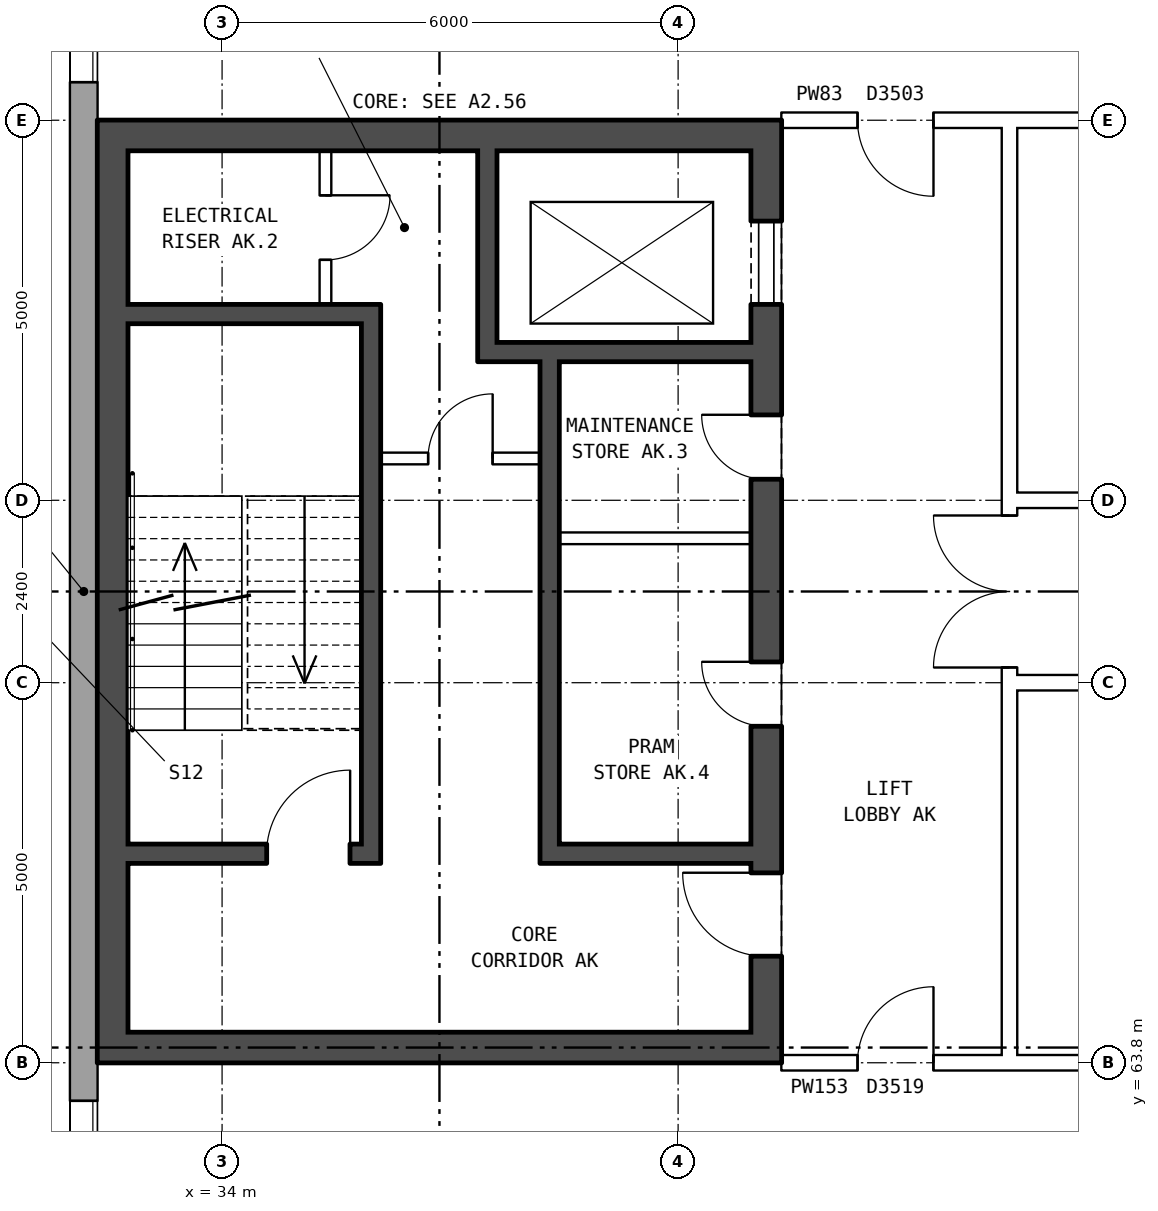
"""IFC4 building model, lengths in metres.
Left out: names, types, materials, properties, quantities, classifications, styles, units other than length and angle.
Written with IfcOpenShell. Run it as: python <this file> out.ifc"""

import sys

from ifc_helpers import new_model, si_unit, direction, frame, frame_2d, origin, place, context, subcontext, project, spatial, rectangle, extrude, element, fill, save


model = new_model("IFC4")
c1 = context("Model", 3, precision=1e-05, world=origin(), true_north=direction((0.0, 1.0)))
c2 = subcontext(c1, "Body", "Model", "MODEL_VIEW")
j1 = project(units=[si_unit("LENGTHUNIT", "METRE"), si_unit("PLANEANGLEUNIT", "RADIAN")], contexts=[c1])
p1 = place(None, origin())
s1 = spatial("IfcSite", under=j1, at=p1, CompositionType="ELEMENT")
p2 = place(p1, origin())
s2 = spatial("IfcBuilding", under=s1, at=p2, CompositionType="ELEMENT")
p3 = place(p2, frame((0.0, 0.0, 194.4)))
s3 = spatial("IfcBuildingStorey", under=s2, at=p3, CompositionType="ELEMENT", Elevation=194.4)
p4 = place(p3, frame((32.18, 82.925, 0.0), z_axis=(0.0, 0.0, 1.0), x_axis=(0.0, -1.0, 0.0)))
e1 = element("IfcWall", 1, at=p4, inside=s3, PredefinedType="STANDARD", context=c2, shape_type="SweptSolid", body=[
    extrude(rectangle(XDim=25.851, YDim=0.36, at=frame_2d((12.925, 0.0))), origin(), (0.0, 0.0, 1.0), 3.95),
])
p5 = place(p4, frame((1.625, 0.0, 1.5)))
e2 = element("IfcOpeningElement", 2, at=p5, cuts=e1, PredefinedType="OPENING", context=c2, shape_type="SweptSolid", body=[
    extrude(rectangle(XDim=1.6, YDim=1.2, at=frame_2d((0.8, 0.6))), frame((0.0, 0.19, 0.0), z_axis=(0.0, -1.0, 0.0), x_axis=(1.0, 0.0, 0.0)), (0.0, 0.0, 1.0), 0.38),
])
p6 = place(p4, frame((4.625, 0.0, 1.5)))
e3 = element("IfcOpeningElement", 3, at=p6, cuts=e1, PredefinedType="OPENING", context=c2, shape_type="SweptSolid", body=[
    extrude(rectangle(XDim=1.6, YDim=1.2, at=frame_2d((0.8, 0.6))), frame((0.0, 0.19, 0.0), z_axis=(0.0, -1.0, 0.0), x_axis=(1.0, 0.0, 0.0)), (0.0, 0.0, 1.0), 0.38),
])
p7 = place(p4, frame((19.625, 0.0, 1.5)))
e4 = element("IfcOpeningElement", 4, at=p7, cuts=e1, PredefinedType="OPENING", context=c2, shape_type="SweptSolid", body=[
    extrude(rectangle(XDim=1.6, YDim=1.2, at=frame_2d((0.8, 0.6))), frame((0.0, 0.19, 0.0), z_axis=(0.0, -1.0, 0.0), x_axis=(1.0, 0.0, 0.0)), (0.0, 0.0, 1.0), 0.38),
])
p8 = place(p4, frame((22.625, 0.0, 1.5)))
e5 = element("IfcOpeningElement", 5, at=p8, cuts=e1, PredefinedType="OPENING", context=c2, shape_type="SweptSolid", body=[
    extrude(rectangle(XDim=1.6, YDim=1.2, at=frame_2d((0.8, 0.6))), frame((0.0, 0.19, 0.0), z_axis=(0.0, -1.0, 0.0), x_axis=(1.0, 0.0, 0.0)), (0.0, 0.0, 1.0), 0.38),
])
p9 = place(p3, frame((41.16, 76.2, 0.0), z_axis=(0.0, 0.0, 1.0), x_axis=(0.0, -1.0, 0.0)))
e6 = element("IfcWall", 6, at=p9, inside=s3, PredefinedType="SHEAR", context=c2, shape_type="SweptSolid", body=[
    extrude(rectangle(XDim=12.4, YDim=0.4, at=frame_2d((6.2, 0.0))), origin(), (0.0, 0.0, 1.0), 3.95),
])
p10 = place(p9, frame((1.325, 0.0, 0.0)))
e7 = element("IfcOpeningElement", 7, at=p10, cuts=e6, PredefinedType="OPENING", context=c2, shape_type="SweptSolid", body=[
    extrude(rectangle(XDim=1.1, YDim=2.1, at=frame_2d((0.55, 1.05))), frame((0.0, 0.21, 0.0), z_axis=(0.0, -1.0, 0.0), x_axis=(1.0, 0.0, 0.0)), (0.0, 0.0, 1.0), 0.42),
])
p11 = place(p9, frame((3.875, 0.0, 0.0)))
e8 = element("IfcOpeningElement", 8, at=p11, cuts=e6, PredefinedType="OPENING", context=c2, shape_type="SweptSolid", body=[
    extrude(rectangle(XDim=0.85, YDim=2.1, at=frame_2d((0.425, 1.05))), frame((0.0, 0.21, 0.0), z_axis=(0.0, -1.0, 0.0), x_axis=(1.0, 0.0, 0.0)), (0.0, 0.0, 1.0), 0.42),
])
p12 = place(p9, frame((7.125, 0.0, 0.0)))
e9 = element("IfcOpeningElement", 9, at=p12, cuts=e6, PredefinedType="OPENING", context=c2, shape_type="SweptSolid", body=[
    extrude(rectangle(XDim=0.85, YDim=2.1, at=frame_2d((0.425, 1.05))), frame((0.0, 0.21, 0.0), z_axis=(0.0, -1.0, 0.0), x_axis=(1.0, 0.0, 0.0)), (0.0, 0.0, 1.0), 0.42),
])
p13 = place(p9, frame((9.9, 0.0, 0.0)))
e10 = element("IfcOpeningElement", 10, at=p13, cuts=e6, PredefinedType="OPENING", context=c2, shape_type="SweptSolid", body=[
    extrude(rectangle(XDim=1.1, YDim=2.1, at=frame_2d((0.55, 1.05))), frame((0.0, 0.21, 0.0), z_axis=(0.0, -1.0, 0.0), x_axis=(1.0, 0.0, 0.0)), (0.0, 0.0, 1.0), 0.42),
])
p14 = place(p3, frame((32.56, 76.2, 0.0), z_axis=(0.0, 0.0, 1.0), x_axis=(0.0, -1.0, 0.0)))
e11 = element("IfcWall", 11, at=p14, inside=s3, PredefinedType="SHEAR", context=c2, shape_type="SweptSolid", body=[
    extrude(rectangle(XDim=12.4, YDim=0.4, at=frame_2d((6.2, 0.0))), origin(), (0.0, 0.0, 1.0), 3.95),
])
for number, where, z_axis, x_axis in (
    (12, (40.96, 76.0, 0.0), (0.0, 0.0, 1.0), (-1.0, 0.0, 0.0)),
    (13, (40.96, 64.0, 0.0), (0.0, 0.0, 1.0), (-1.0, 0.0, 0.0)),
):
    element("IfcWall", number, at=place(p3, frame(where, z_axis=z_axis, x_axis=x_axis)), inside=s3, PredefinedType="SHEAR", context=c2, shape_type="SweptSolid", body=[
        extrude(rectangle(XDim=8.2, YDim=0.4, at=frame_2d((4.1, 0.0))), origin(), (0.0, 0.0, 1.0), 3.95),
    ])
p15 = place(p3, frame((35.835, 73.65, 0.0), z_axis=(0.0, 0.0, 1.0), x_axis=(-1.0, 0.0, 0.0)))
e14 = element("IfcWall", 14, at=p15, inside=s3, PredefinedType="SHEAR", context=c2, shape_type="SweptSolid", body=[
    extrude(rectangle(XDim=3.075, YDim=0.25, at=frame_2d((1.538, 0.0))), origin(), (0.0, 0.0, 1.0), 3.95),
])
p16 = place(p3, frame((40.96, 73.15, 0.0), z_axis=(0.0, 0.0, 1.0), x_axis=(-1.0, 0.0, 0.0)))
e15 = element("IfcWall", 15, at=p16, inside=s3, PredefinedType="SHEAR", context=c2, shape_type="SweptSolid", body=[
    extrude(rectangle(XDim=3.595, YDim=0.25, at=frame_2d((1.797, 0.0))), origin(), (0.0, 0.0, 1.0), 3.95),
])
p17 = place(p3, frame((38.185, 71.75, 0.0), z_axis=(0.0, 0.0, 1.0), x_axis=(-1.0, 0.0, 0.0)))
e16 = element("IfcWall", 16, at=p17, inside=s3, PredefinedType="PARTITIONING", context=c2, shape_type="SweptSolid", body=[
    extrude(rectangle(XDim=2.1, YDim=0.15, at=frame_2d((1.05, 0.0))), origin(), (0.0, 0.0, 1.0), 3.95),
])
p18 = place(p17, frame((0.625, 0.0, 0.0)))
e17 = element("IfcOpeningElement", 17, at=p18, cuts=e16, PredefinedType="OPENING", context=c2, shape_type="SweptSolid", body=[
    extrude(rectangle(XDim=0.85, YDim=2.1, at=frame_2d((0.425, 1.05))), frame((0.0, 0.085, 0.0), z_axis=(0.0, -1.0, 0.0), x_axis=(1.0, 0.0, 0.0)), (0.0, 0.0, 1.0), 0.17),
])
p19 = place(p3, frame((40.96, 70.7, 0.0), z_axis=(0.0, 0.0, 1.0), x_axis=(-1.0, 0.0, 0.0)))
e18 = element("IfcWall", 18, at=p19, inside=s3, PredefinedType="PARTITIONING", context=c2, shape_type="SweptSolid", body=[
    extrude(rectangle(XDim=2.525, YDim=0.15, at=frame_2d((1.262, 0.0))), origin(), (0.0, 0.0, 1.0), 3.95),
])
p20 = place(p3, frame((40.96, 66.55, 0.0), z_axis=(0.0, 0.0, 1.0), x_axis=(-1.0, 0.0, 0.0)))
e19 = element("IfcWall", 19, at=p20, inside=s3, PredefinedType="SHEAR", context=c2, shape_type="SweptSolid", body=[
    extrude(rectangle(XDim=2.525, YDim=0.25, at=frame_2d((1.262, 0.0))), origin(), (0.0, 0.0, 1.0), 3.95),
])
p21 = place(p3, frame((35.835, 66.55, 0.0), z_axis=(0.0, 0.0, 1.0), x_axis=(-1.0, 0.0, 0.0)))
e20 = element("IfcWall", 20, at=p21, inside=s3, PredefinedType="SHEAR", context=c2, shape_type="SweptSolid", body=[
    extrude(rectangle(XDim=3.075, YDim=0.25, at=frame_2d((1.538, 0.0))), origin(), (0.0, 0.0, 1.0), 3.95),
])
p22 = place(p21, frame((0.15, 0.0, 0.0)))
e21 = element("IfcOpeningElement", 21, at=p22, cuts=e20, PredefinedType="OPENING", context=c2, shape_type="SweptSolid", body=[
    extrude(rectangle(XDim=1.1, YDim=2.1, at=frame_2d((0.55, 1.05))), frame((0.0, 0.135, 0.0), z_axis=(0.0, -1.0, 0.0), x_axis=(1.0, 0.0, 0.0)), (0.0, 0.0, 1.0), 0.27),
])
p23 = place(p3, frame((38.31, 73.025, 0.0), z_axis=(0.0, 0.0, 1.0), x_axis=(0.0, -1.0, 0.0)))
e22 = element("IfcWall", 22, at=p23, inside=s3, PredefinedType="SHEAR", context=c2, shape_type="SweptSolid", body=[
    extrude(rectangle(XDim=6.6, YDim=0.25, at=frame_2d((3.3, 0.0))), origin(), (0.0, 0.0, 1.0), 3.95),
])
p24 = place(p3, frame((37.49, 75.8, 0.0), z_axis=(0.0, 0.0, 1.0), x_axis=(0.0, -1.0, 0.0)))
e23 = element("IfcWall", 23, at=p24, inside=s3, PredefinedType="SHEAR", context=c2, shape_type="SweptSolid", body=[
    extrude(rectangle(XDim=2.525, YDim=0.25, at=frame_2d((1.263, 0.0))), origin(), (0.0, 0.0, 1.0), 3.95),
])
p25 = place(p3, frame((35.96, 73.775, 0.0), z_axis=(0.0, 0.0, 1.0), x_axis=(0.0, -1.0, 0.0)))
e24 = element("IfcWall", 24, at=p25, inside=s3, PredefinedType="SHEAR", context=c2, shape_type="SweptSolid", body=[
    extrude(rectangle(XDim=7.35, YDim=0.25, at=frame_2d((3.675, 0.0))), origin(), (0.0, 0.0, 1.0), 3.95),
])
p26 = place(p3, frame((35.36, 75.8, 0.0), z_axis=(0.0, 0.0, 1.0), x_axis=(0.0, -1.0, 0.0)))
e25 = element("IfcWall", 25, at=p26, inside=s3, PredefinedType="PARTITIONING", context=c2, shape_type="SweptSolid", body=[
    extrude(rectangle(XDim=2.025, YDim=0.15, at=frame_2d((1.013, 0.0))), origin(), (0.0, 0.0, 1.0), 3.95),
])
p27 = place(p26, frame((0.587, 0.0, 0.0)))
e26 = element("IfcOpeningElement", 26, at=p27, cuts=e25, PredefinedType="OPENING", context=c2, shape_type="SweptSolid", body=[
    extrude(rectangle(XDim=0.85, YDim=2.1, at=frame_2d((0.425, 1.05))), frame((0.0, 0.085, 0.0), z_axis=(0.0, -1.0, 0.0), x_axis=(1.0, 0.0, 0.0)), (0.0, 0.0, 1.0), 0.17),
])
p28 = place(p3, frame((44.36, 63.9, 0.0), z_axis=(0.0, 0.0, 1.0), x_axis=(0.0, 1.0, 0.0)))
e27 = element("IfcWall", 27, at=p28, inside=s3, PredefinedType="PARTITIONING", context=c2, shape_type="SweptSolid", body=[
    extrude(rectangle(XDim=12.2, YDim=0.2, at=frame_2d((6.1, 0.0))), origin(), (0.0, 0.0, 1.0), 3.95),
])
p29 = place(p28, frame((5.1, 0.0, 0.0)))
e28 = element("IfcOpeningElement", 28, at=p29, cuts=e27, PredefinedType="OPENING", context=c2, shape_type="SweptSolid", body=[
    extrude(rectangle(XDim=2.0, YDim=2.1, at=frame_2d((1.0, 1.05))), frame((0.0, 0.11, 0.0), z_axis=(0.0, -1.0, 0.0), x_axis=(1.0, 0.0, 0.0)), (0.0, 0.0, 1.0), 0.22),
])
p30 = place(p3, frame((44.36, 63.8, 0.0), z_axis=(0.0, 0.0, 1.0), x_axis=(1.0, 0.0, 0.0)))
e29 = element("IfcWall", 29, at=p30, inside=s3, PredefinedType="PARTITIONING", context=c2, shape_type="SweptSolid", body=[
    extrude(rectangle(XDim=19.28, YDim=0.2, at=frame_2d((9.64, 0.0))), origin(), (0.0, 0.0, 1.0), 3.95),
])
p31 = place(p30, frame((4.32, 0.0, 0.0)))
e30 = element("IfcOpeningElement", 30, at=p31, cuts=e29, PredefinedType="OPENING", context=c2, shape_type="SweptSolid", body=[
    extrude(rectangle(XDim=1.0, YDim=2.1, at=frame_2d((0.5, 1.05))), frame((0.0, 0.11, 0.0), z_axis=(0.0, -1.0, 0.0), x_axis=(1.0, 0.0, 0.0)), (0.0, 0.0, 1.0), 0.22),
])
p32 = place(p30, frame((13.96, 0.0, 0.0)))
e31 = element("IfcOpeningElement", 31, at=p32, cuts=e29, PredefinedType="OPENING", context=c2, shape_type="SweptSolid", body=[
    extrude(rectangle(XDim=1.0, YDim=2.1, at=frame_2d((0.5, 1.05))), frame((0.0, 0.11, 0.0), z_axis=(0.0, -1.0, 0.0), x_axis=(1.0, 0.0, 0.0)), (0.0, 0.0, 1.0), 0.22),
])
p33 = place(p3, frame((41.36, 63.8, 0.0), z_axis=(0.0, 0.0, 1.0), x_axis=(1.0, 0.0, 0.0)))
e32 = element("IfcWall", 32, at=p33, inside=s3, PredefinedType="PARTITIONING", context=c2, shape_type="SweptSolid", body=[
    extrude(rectangle(XDim=3.0, YDim=0.2, at=frame_2d((1.5, 0.0))), origin(), (0.0, 0.0, 1.0), 3.95),
])
p34 = place(p33, frame((1.0, 0.0, 0.0)))
e33 = element("IfcOpeningElement", 33, at=p34, cuts=e32, PredefinedType="OPENING", context=c2, shape_type="SweptSolid", body=[
    extrude(rectangle(XDim=1.0, YDim=2.1, at=frame_2d((0.5, 1.05))), frame((0.0, 0.11, 0.0), z_axis=(0.0, -1.0, 0.0), x_axis=(1.0, 0.0, 0.0)), (0.0, 0.0, 1.0), 0.22),
])
for number, where, z_axis, x_axis in (
    (34, (44.36, 68.8, 0.0), (0.0, 0.0, 1.0), (1.0, 0.0, 0.0)),
    (35, (44.36, 71.2, 0.0), (0.0, 0.0, 1.0), (1.0, 0.0, 0.0)),
):
    element("IfcWall", number, at=place(p3, frame(where, z_axis=z_axis, x_axis=x_axis)), inside=s3, PredefinedType="PARTITIONING", context=c2, shape_type="SweptSolid", body=[
        extrude(rectangle(XDim=19.28, YDim=0.2, at=frame_2d((9.64, 0.0))), origin(), (0.0, 0.0, 1.0), 3.95),
    ])
p35 = place(p3, frame((44.36, 76.2, 0.0), z_axis=(0.0, 0.0, 1.0), x_axis=(1.0, 0.0, 0.0)))
e36 = element("IfcWall", 36, at=p35, inside=s3, PredefinedType="PARTITIONING", context=c2, shape_type="SweptSolid", body=[
    extrude(rectangle(XDim=19.28, YDim=0.2, at=frame_2d((9.64, 0.0))), origin(), (0.0, 0.0, 1.0), 3.95),
])
p36 = place(p35, frame((3.32, 0.0, 0.0)))
e37 = element("IfcOpeningElement", 37, at=p36, cuts=e36, PredefinedType="OPENING", context=c2, shape_type="SweptSolid", body=[
    extrude(rectangle(XDim=1.0, YDim=2.1, at=frame_2d((0.5, 1.05))), frame((0.0, 0.11, 0.0), z_axis=(0.0, -1.0, 0.0), x_axis=(1.0, 0.0, 0.0)), (0.0, 0.0, 1.0), 0.22),
])
p37 = place(p35, frame((12.96, 0.0, 0.0)))
e38 = element("IfcOpeningElement", 38, at=p37, cuts=e36, PredefinedType="OPENING", context=c2, shape_type="SweptSolid", body=[
    extrude(rectangle(XDim=1.0, YDim=2.1, at=frame_2d((0.5, 1.05))), frame((0.0, 0.11, 0.0), z_axis=(0.0, -1.0, 0.0), x_axis=(1.0, 0.0, 0.0)), (0.0, 0.0, 1.0), 0.22),
])
p38 = place(p3, frame((41.36, 76.2, 0.0), z_axis=(0.0, 0.0, 1.0), x_axis=(1.0, 0.0, 0.0)))
e39 = element("IfcWall", 39, at=p38, inside=s3, PredefinedType="PARTITIONING", context=c2, shape_type="SweptSolid", body=[
    extrude(rectangle(XDim=3.0, YDim=0.2, at=frame_2d((1.5, 0.0))), origin(), (0.0, 0.0, 1.0), 3.95),
])
p39 = place(p38, frame((1.0, 0.0, 0.0)))
e40 = element("IfcOpeningElement", 40, at=p39, cuts=e39, PredefinedType="OPENING", context=c2, shape_type="SweptSolid", body=[
    extrude(rectangle(XDim=1.0, YDim=2.1, at=frame_2d((0.5, 1.05))), frame((0.0, 0.11, 0.0), z_axis=(0.0, -1.0, 0.0), x_axis=(1.0, 0.0, 0.0)), (0.0, 0.0, 1.0), 0.22),
])
p40 = place(p6, origin())
e41 = element("IfcWindow", 41, at=p40, inside=s3, PartitioningType="DOUBLE_PANEL_HORIZONTAL", PredefinedType="WINDOW", context=c2, shape_type="SweptSolid", body=[
    extrude(rectangle(XDim=1.6, YDim=1.2, at=frame_2d((0.8, 0.6))), frame((0.0, 0.15, 0.0), z_axis=(0.0, -1.0, 0.0), x_axis=(1.0, 0.0, 0.0)), (0.0, 0.0, 1.0), 0.06),
])
fill(e3, e41)
p41 = place(p7, origin())
e42 = element("IfcWindow", 42, at=p41, inside=s3, PartitioningType="DOUBLE_PANEL_HORIZONTAL", PredefinedType="WINDOW", context=c2, shape_type="SweptSolid", body=[
    extrude(rectangle(XDim=1.6, YDim=1.2, at=frame_2d((0.8, 0.6))), frame((0.0, 0.15, 0.0), z_axis=(0.0, -1.0, 0.0), x_axis=(1.0, 0.0, 0.0)), (0.0, 0.0, 1.0), 0.06),
])
fill(e4, e42)
p42 = place(p10, origin())
e43 = element("IfcDoor", 43, at=p42, inside=s3, OperationType="DOUBLE_DOOR_SLIDING", PredefinedType="DOOR", context=c2, shape_type="SweptSolid", body=[
    extrude(rectangle(XDim=1.1, YDim=2.1, at=frame_2d((0.55, 1.05))), frame((0.0, -0.135, 0.0), z_axis=(0.0, -1.0, 0.0), x_axis=(1.0, 0.0, 0.0)), (0.0, 0.0, 1.0), 0.05),
])
fill(e7, e43)
p43 = place(p11, frame((0.85, 0.0, 0.0), z_axis=(0.0, 0.0, 1.0), x_axis=(-1.0, 0.0, 0.0)))
e44 = element("IfcDoor", 44, at=p43, inside=s3, OperationType="SINGLE_SWING_RIGHT", PredefinedType="DOOR", context=c2, shape_type="SweptSolid", body=[
    extrude(rectangle(XDim=0.85, YDim=2.1, at=frame_2d((0.425, 1.05))), frame((0.0, 0.185, 0.0), z_axis=(0.0, -1.0, 0.0), x_axis=(1.0, 0.0, 0.0)), (0.0, 0.0, 1.0), 0.05),
])
fill(e8, e44)
p44 = place(p12, frame((0.85, 0.0, 0.0), z_axis=(0.0, 0.0, 1.0), x_axis=(-1.0, 0.0, 0.0)))
e45 = element("IfcDoor", 45, at=p44, inside=s3, OperationType="SINGLE_SWING_RIGHT", PredefinedType="DOOR", context=c2, shape_type="SweptSolid", body=[
    extrude(rectangle(XDim=0.85, YDim=2.1, at=frame_2d((0.425, 1.05))), frame((0.0, 0.185, 0.0), z_axis=(0.0, -1.0, 0.0), x_axis=(1.0, 0.0, 0.0)), (0.0, 0.0, 1.0), 0.05),
])
fill(e9, e45)
p45 = place(p13, frame((1.1, 0.0, 0.0), z_axis=(0.0, 0.0, 1.0), x_axis=(-1.0, 0.0, 0.0)))
e46 = element("IfcDoor", 46, at=p45, inside=s3, OperationType="SINGLE_SWING_RIGHT", PredefinedType="DOOR", context=c2, shape_type="SweptSolid", body=[
    extrude(rectangle(XDim=1.1, YDim=2.1, at=frame_2d((0.55, 1.05))), frame((0.0, 0.185, 0.0), z_axis=(0.0, -1.0, 0.0), x_axis=(1.0, 0.0, 0.0)), (0.0, 0.0, 1.0), 0.05),
])
fill(e10, e46)
p46 = place(p22, frame((1.1, 0.0, 0.0), z_axis=(0.0, 0.0, 1.0), x_axis=(-1.0, 0.0, 0.0)))
e47 = element("IfcDoor", 47, at=p46, inside=s3, OperationType="SINGLE_SWING_RIGHT", PredefinedType="DOOR", context=c2, shape_type="SweptSolid", body=[
    extrude(rectangle(XDim=1.1, YDim=2.1, at=frame_2d((0.55, 1.05))), frame((0.0, 0.025, 0.0), z_axis=(0.0, -1.0, 0.0), x_axis=(1.0, 0.0, 0.0)), (0.0, 0.0, 1.0), 0.05),
])
fill(e21, e47)
p47 = place(p18, frame((0.85, 0.0, 0.0), z_axis=(0.0, 0.0, 1.0), x_axis=(-1.0, 0.0, 0.0)))
e48 = element("IfcDoor", 48, at=p47, inside=s3, OperationType="SINGLE_SWING_RIGHT", PredefinedType="DOOR", context=c2, shape_type="SweptSolid", body=[
    extrude(rectangle(XDim=0.85, YDim=2.1, at=frame_2d((0.425, 1.05))), frame((0.0, 0.025, 0.0), z_axis=(0.0, -1.0, 0.0), x_axis=(1.0, 0.0, 0.0)), (0.0, 0.0, 1.0), 0.05),
])
fill(e17, e48)
p48 = place(p27, origin())
e49 = element("IfcDoor", 49, at=p48, inside=s3, OperationType="SINGLE_SWING_LEFT", PredefinedType="DOOR", context=c2, shape_type="SweptSolid", body=[
    extrude(rectangle(XDim=0.85, YDim=2.1, at=frame_2d((0.425, 1.05))), frame((0.0, 0.025, 0.0), z_axis=(0.0, -1.0, 0.0), x_axis=(1.0, 0.0, 0.0)), (0.0, 0.0, 1.0), 0.05),
])
fill(e26, e49)
p49 = place(p29, origin())
e50 = element("IfcDoor", 50, at=p49, inside=s3, OperationType="DOUBLE_DOOR_SINGLE_SWING", PredefinedType="DOOR", context=c2, shape_type="SweptSolid", body=[
    extrude(rectangle(XDim=2.0, YDim=2.1, at=frame_2d((1.0, 1.05))), frame((0.0, 0.025, 0.0), z_axis=(0.0, -1.0, 0.0), x_axis=(1.0, 0.0, 0.0)), (0.0, 0.0, 1.0), 0.05),
])
fill(e28, e50)
p50 = place(p34, origin())
e51 = element("IfcDoor", 51, at=p50, inside=s3, OperationType="SINGLE_SWING_RIGHT", PredefinedType="DOOR", context=c2, shape_type="SweptSolid", body=[
    extrude(rectangle(XDim=1.0, YDim=2.1, at=frame_2d((0.5, 1.05))), frame((0.0, 0.025, 0.0), z_axis=(0.0, -1.0, 0.0), x_axis=(1.0, 0.0, 0.0)), (0.0, 0.0, 1.0), 0.05),
])
fill(e33, e51)
p51 = place(p39, frame((1.0, 0.0, 0.0), z_axis=(0.0, 0.0, 1.0), x_axis=(-1.0, 0.0, 0.0)))
e52 = element("IfcDoor", 52, at=p51, inside=s3, OperationType="SINGLE_SWING_LEFT", PredefinedType="DOOR", context=c2, shape_type="SweptSolid", body=[
    extrude(rectangle(XDim=1.0, YDim=2.1, at=frame_2d((0.5, 1.05))), frame((0.0, 0.025, 0.0), z_axis=(0.0, -1.0, 0.0), x_axis=(1.0, 0.0, 0.0)), (0.0, 0.0, 1.0), 0.05),
])
fill(e40, e52)
save(model, sys.argv[1])
